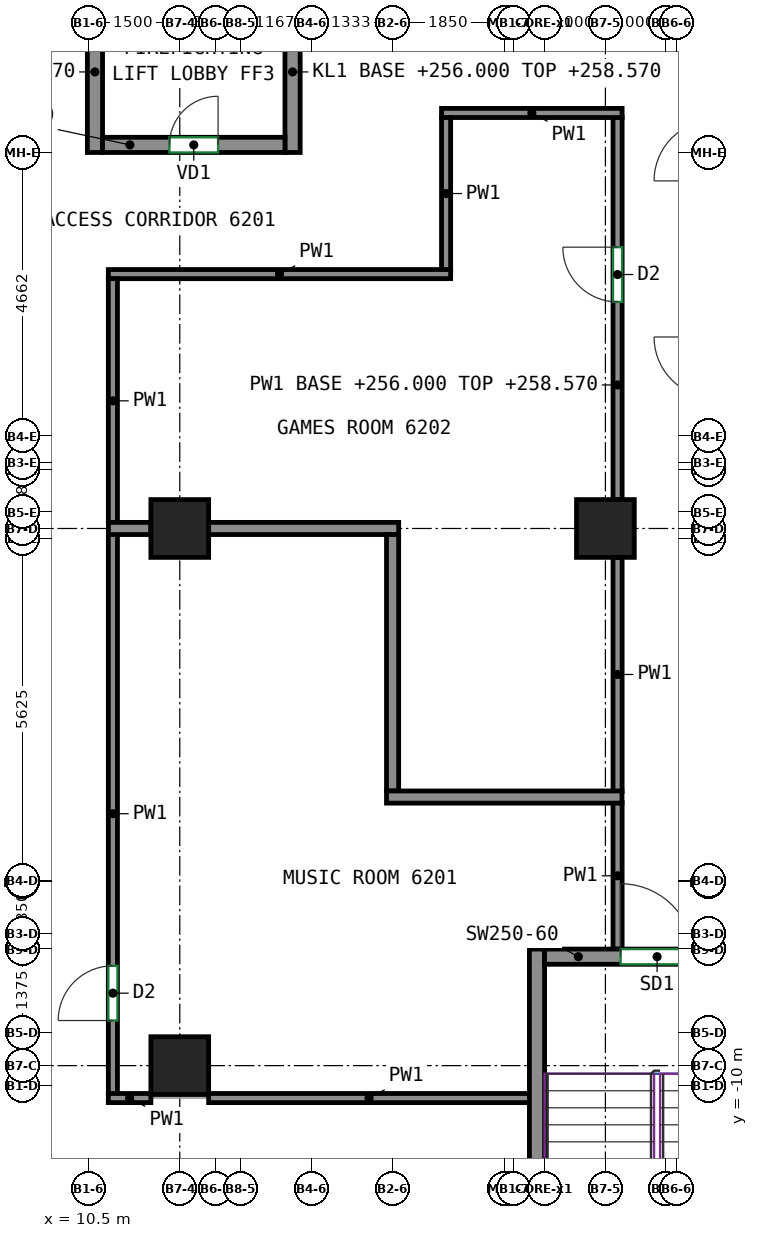
"""IFC4 building model, lengths in metres.
Left out: names, types, materials, properties, quantities, classifications, styles, units other than length and angle.
Written with IfcOpenShell. Run it as: python <this file> out.ifc"""

import sys

from ifc_helpers import new_model, si_unit, direction, frame, frame_2d, origin, origin_2d, place, context, subcontext, project, spatial, rectangle, extrude, source, transform, mapped, element, fill, save


model = new_model("IFC4")
c1 = context("Model", 3, precision=1e-05, world=origin(), true_north=direction((0.0, 1.0)))
c2 = subcontext(c1, "Body", "Model", "MODEL_VIEW")
j1 = project(units=[si_unit("LENGTHUNIT", "METRE"), si_unit("PLANEANGLEUNIT", "RADIAN")], contexts=[c1])
p1 = place(None, origin())
s1 = spatial("IfcSite", under=j1, at=p1, CompositionType="ELEMENT")
p2 = place(p1, origin())
s2 = spatial("IfcBuilding", under=s1, at=p2, CompositionType="ELEMENT")
p3 = place(p2, frame((0.0, 0.0, 256.0)))
s3 = spatial("IfcBuildingStorey", under=s2, at=p3, CompositionType="ELEMENT", Elevation=256.0)
m1 = source(origin(), c2, "Body", "SweptSolid", [
    extrude(rectangle(XDim=0.95, YDim=0.95, at=origin_2d()), origin(), (0.0, 0.0, 1.0), 3.12),
])
for number, where, z_axis, x_axis in (
    (1, (12.0, -9.667, 0.0), (0.0, 0.0, 1.0), (1.0, 0.0, 0.0)),
    (2, (12.0, -0.833, 0.0), (0.0, 0.0, 1.0), (1.0, 0.0, 0.0)),
    (3, (19.0, -0.833, 0.0), (0.0, 0.0, 1.0), (1.0, 0.0, 0.0)),
):
    element("IfcColumn", number, at=place(p3, frame(where, z_axis=z_axis, x_axis=x_axis)), inside=s3, PredefinedType="COLUMN", context=c2, shape_type="MappedRepresentation", body=[
        mapped(m1, transform((0.0, 0.0, 0.0))),
    ])
m2 = source(origin(), c2, "Body", "SweptSolid", [
    extrude(rectangle(XDim=8.0, YDim=0.25, at=frame_2d((4.0, 0.0))), origin(), (0.0, 0.0, 1.0), 3.12),
])
p4 = place(p3, frame((17.875, -15.75, 0.0), z_axis=(0.0, 0.0, 1.0), x_axis=(0.0, 1.0, 0.0)))
e4 = element("IfcWall", 4, at=p4, inside=s3, PredefinedType="SHEAR", context=c2, shape_type="MappedRepresentation", body=[
    mapped(m2, transform((0.0, 0.0, 0.0))),
])
m3 = source(origin(), c2, "Body", "SweptSolid", [
    extrude(rectangle(XDim=3.7, YDim=0.25, at=frame_2d((1.85, 0.0))), origin(), (0.0, 0.0, 1.0), 3.12),
])
p5 = place(p3, frame((18.0, -7.875, 0.0), z_axis=(0.0, 0.0, 1.0), x_axis=(1.0, 0.0, 0.0)))
e5 = element("IfcWall", 5, at=p5, inside=s3, PredefinedType="SHEAR", context=c2, shape_type="MappedRepresentation", body=[
    mapped(m3, transform((0.0, 0.0, 0.0))),
])
p6 = place(p5, frame((1.25, 0.0, 0.0)))
e6 = element("IfcOpeningElement", 6, at=p6, cuts=e5, PredefinedType="OPENING", context=c2, shape_type="SweptSolid", body=[
    extrude(rectangle(XDim=1.2, YDim=2.1, at=frame_2d((0.6, 1.05))), frame((0.0, 0.135, 0.0), z_axis=(0.0, -1.0, 0.0), x_axis=(1.0, 0.0, 0.0)), (0.0, 0.0, 1.0), 0.27),
])
m4 = source(origin(), c2, "Body", "SweptSolid", [
    extrude(rectangle(XDim=2.65, YDim=0.25, at=frame_2d((1.325, 0.0))), origin(), (0.0, 0.0, 1.0), 2.57),
])
for number, where, z_axis, x_axis in (
    (7, (10.605, 5.35, 0.0), (0.0, 0.0, 1.0), (0.0, 1.0, 0.0)),
    (8, (13.855, 5.35, 0.0), (0.0, 0.0, 1.0), (0.0, 1.0, 0.0)),
):
    element("IfcWall", number, at=place(p3, frame(where, z_axis=z_axis, x_axis=x_axis)), inside=s3, PredefinedType="PARTITIONING", context=c2, shape_type="MappedRepresentation", body=[
        mapped(m4, transform((0.0, 0.0, 0.0))),
    ])
m5 = source(origin(), c2, "Body", "SweptSolid", [
    extrude(rectangle(XDim=3.0, YDim=0.25, at=frame_2d((1.5, 0.0))), origin(), (0.0, 0.0, 1.0), 3.12),
])
p7 = place(p3, frame((10.73, 5.475, 0.0), z_axis=(0.0, 0.0, 1.0), x_axis=(1.0, 0.0, 0.0)))
e9 = element("IfcWall", 9, at=p7, inside=s3, PredefinedType="PARTITIONING", context=c2, shape_type="MappedRepresentation", body=[
    mapped(m5, transform((0.0, 0.0, 0.0))),
])
p8 = place(p7, frame((1.1, 0.0, 0.0)))
e10 = element("IfcOpeningElement", 10, at=p8, cuts=e9, PredefinedType="OPENING", context=c2, shape_type="SweptSolid", body=[
    extrude(rectangle(XDim=0.8, YDim=2.0, at=frame_2d((0.4, 1.0))), frame((0.0, 0.135, 0.0), z_axis=(0.0, -1.0, 0.0), x_axis=(1.0, 0.0, 0.0)), (0.0, 0.0, 1.0), 0.27),
])
p9 = place(p3, frame((19.2, -7.75, 0.0), z_axis=(0.0, 0.0, 1.0), x_axis=(0.0, 1.0, 0.0)))
e11 = element("IfcWall", 11, at=p9, inside=s3, PredefinedType="PARTITIONING", context=c2, shape_type="SweptSolid", body=[
    extrude(rectangle(XDim=2.41, YDim=0.15, at=frame_2d((1.205, 0.0))), origin(), (0.0, 0.0, 1.0), 3.12),
])
p10 = place(p3, frame((10.9, -10.125, 0.0), z_axis=(0.0, 0.0, 1.0), x_axis=(0.0, 1.0, 0.0)))
e12 = element("IfcWall", 12, at=p10, inside=s3, PredefinedType="PARTITIONING", context=c2, shape_type="SweptSolid", body=[
    extrude(rectangle(XDim=9.202, YDim=0.15, at=frame_2d((4.601, 0.0))), origin(), (0.0, 0.0, 1.0), 3.12),
])
p11 = place(p10, frame((1.2, 0.0, 0.0)))
e13 = element("IfcOpeningElement", 13, at=p11, cuts=e12, PredefinedType="OPENING", context=c2, shape_type="SweptSolid", body=[
    extrude(rectangle(XDim=0.9, YDim=2.1, at=frame_2d((0.45, 1.05))), frame((0.0, 0.085, 0.0), z_axis=(0.0, -1.0, 0.0), x_axis=(1.0, 0.0, 0.0)), (0.0, 0.0, 1.0), 0.17),
])
p12 = place(p3, frame((12.475, -10.2, 0.0), z_axis=(0.0, 0.0, 1.0), x_axis=(1.0, 0.0, 0.0)))
e14 = element("IfcWall", 14, at=p12, inside=s3, PredefinedType="PARTITIONING", context=c2, shape_type="SweptSolid", body=[
    extrude(rectangle(XDim=5.275, YDim=0.15, at=frame_2d((2.637, 0.0))), origin(), (0.0, 0.0, 1.0), 3.12),
])
p13 = place(p3, frame((10.825, -10.2, 0.0), z_axis=(0.0, 0.0, 1.0), x_axis=(1.0, 0.0, 0.0)))
e15 = element("IfcWall", 15, at=p13, inside=s3, PredefinedType="PARTITIONING", context=c2, shape_type="SweptSolid", body=[
    extrude(rectangle(XDim=0.7, YDim=0.15, at=frame_2d((0.35, 0.0))), origin(), (0.0, 0.0, 1.0), 3.12),
])
p14 = place(p3, frame((19.2, -5.16, 0.0), z_axis=(0.0, 0.0, 1.0), x_axis=(0.0, 1.0, 0.0)))
e16 = element("IfcWall", 16, at=p14, inside=s3, PredefinedType="PARTITIONING", context=c2, shape_type="SweptSolid", body=[
    extrude(rectangle(XDim=3.852, YDim=0.15, at=frame_2d((1.926, 0.0))), origin(), (0.0, 0.0, 1.0), 3.12),
])
p15 = place(p3, frame((19.2, -0.358, 0.0), z_axis=(0.0, 0.0, 1.0), x_axis=(0.0, 1.0, 0.0)))
e17 = element("IfcWall", 17, at=p15, inside=s3, PredefinedType="PARTITIONING", context=c2, shape_type="SweptSolid", body=[
    extrude(rectangle(XDim=6.283, YDim=0.15, at=frame_2d((3.142, 0.0))), origin(), (0.0, 0.0, 1.0), 2.57),
])
p16 = place(p15, frame((3.251, 0.0, 0.0)))
e18 = element("IfcOpeningElement", 18, at=p16, cuts=e17, PredefinedType="OPENING", context=c2, shape_type="SweptSolid", body=[
    extrude(rectangle(XDim=0.9, YDim=2.1, at=frame_2d((0.45, 1.05))), frame((0.0, 0.085, 0.0), z_axis=(0.0, -1.0, 0.0), x_axis=(1.0, 0.0, 0.0)), (0.0, 0.0, 1.0), 0.17),
])
p17 = place(p3, frame((16.305, 6.0, 0.0), z_axis=(0.0, 0.0, 1.0), x_axis=(1.0, 0.0, 0.0)))
e19 = element("IfcWall", 19, at=p17, inside=s3, PredefinedType="PARTITIONING", context=c2, shape_type="SweptSolid", body=[
    extrude(rectangle(XDim=2.97, YDim=0.15, at=frame_2d((1.485, 0.0))), origin(), (0.0, 0.0, 1.0), 3.12),
])
p18 = place(p3, frame((16.38, 3.425, 0.0), z_axis=(0.0, 0.0, 1.0), x_axis=(0.0, 1.0, 0.0)))
e20 = element("IfcWall", 20, at=p18, inside=s3, PredefinedType="PARTITIONING", context=c2, shape_type="SweptSolid", body=[
    extrude(rectangle(XDim=2.5, YDim=0.15, at=frame_2d((1.25, 0.0))), origin(), (0.0, 0.0, 1.0), 3.12),
])
p19 = place(p3, frame((10.825, 3.35, 0.0), z_axis=(0.0, 0.0, 1.0), x_axis=(1.0, 0.0, 0.0)))
e21 = element("IfcWall", 21, at=p19, inside=s3, PredefinedType="PARTITIONING", context=c2, shape_type="SweptSolid", body=[
    extrude(rectangle(XDim=5.63, YDim=0.15, at=frame_2d((2.815, 0.0))), origin(), (0.0, 0.0, 1.0), 3.12),
])
p20 = place(p3, frame((10.9, -0.743, 0.0), z_axis=(0.0, 0.0, 1.0), x_axis=(0.0, 1.0, 0.0)))
e22 = element("IfcWall", 22, at=p20, inside=s3, PredefinedType="PARTITIONING", context=c2, shape_type="SweptSolid", body=[
    extrude(rectangle(XDim=4.018, YDim=0.15, at=frame_2d((2.009, 0.0))), origin(), (0.0, 0.0, 1.0), 3.12),
])
p21 = place(p3, frame((10.827, -0.833, 0.0), z_axis=(0.0, 0.0, 1.0), x_axis=(1.0, 0.0, 0.0)))
e23 = element("IfcWall", 23, at=p21, inside=s3, PredefinedType="PARTITIONING", context=c2, shape_type="SweptSolid", body=[
    extrude(rectangle(XDim=0.698, YDim=0.2, at=frame_2d((0.349, 0.0))), origin(), (0.0, 0.0, 1.0), 3.12),
])
p22 = place(p3, frame((12.475, -0.833, 0.0), z_axis=(0.0, 0.0, 1.0), x_axis=(1.0, 0.0, 0.0)))
e24 = element("IfcWall", 24, at=p22, inside=s3, PredefinedType="PARTITIONING", context=c2, shape_type="SweptSolid", body=[
    extrude(rectangle(XDim=3.125, YDim=0.2, at=frame_2d((1.562, 0.0))), origin(), (0.0, 0.0, 1.0), 3.12),
])
p23 = place(p3, frame((15.5, -5.15, 0.0), z_axis=(0.0, 0.0, 1.0), x_axis=(0.0, 1.0, 0.0)))
e25 = element("IfcWall", 25, at=p23, inside=s3, PredefinedType="PARTITIONING", context=c2, shape_type="SweptSolid", body=[
    extrude(rectangle(XDim=4.217, YDim=0.2, at=frame_2d((2.108, 0.0))), origin(), (0.0, 0.0, 1.0), 3.12),
])
p24 = place(p3, frame((15.4, -5.25, 0.0), z_axis=(0.0, 0.0, 1.0), x_axis=(1.0, 0.0, 0.0)))
e26 = element("IfcWall", 26, at=p24, inside=s3, PredefinedType="PARTITIONING", context=c2, shape_type="SweptSolid", body=[
    extrude(rectangle(XDim=3.873, YDim=0.2, at=frame_2d((1.937, 0.0))), origin(), (0.0, 0.0, 1.0), 3.12),
])
p25 = place(p8, origin())
e27 = element("IfcDoor", 27, at=p25, inside=s3, OperationType="SINGLE_SWING_RIGHT", PredefinedType="DOOR", context=c2, shape_type="SweptSolid", body=[
    extrude(rectangle(XDim=0.8, YDim=2.0, at=frame_2d((0.4, 1.0))), frame((0.0, 0.025, 0.0), z_axis=(0.0, -1.0, 0.0), x_axis=(1.0, 0.0, 0.0)), (0.0, 0.0, 1.0), 0.05),
])
fill(e10, e27)
p26 = place(p6, origin())
e28 = element("IfcDoor", 28, at=p26, inside=s3, OperationType="DOUBLE_DOOR_SINGLE_SWING", PredefinedType="DOOR", context=c2, shape_type="SweptSolid", body=[
    extrude(rectangle(XDim=1.2, YDim=2.1, at=frame_2d((0.6, 1.05))), frame((0.0, 0.025, 0.0), z_axis=(0.0, -1.0, 0.0), x_axis=(1.0, 0.0, 0.0)), (0.0, 0.0, 1.0), 0.05),
])
fill(e6, e28)
p27 = place(p11, origin())
e29 = element("IfcDoor", 29, at=p27, inside=s3, OperationType="SINGLE_SWING_LEFT", PredefinedType="DOOR", context=c2, shape_type="SweptSolid", body=[
    extrude(rectangle(XDim=0.9, YDim=2.1, at=frame_2d((0.45, 1.05))), frame((0.0, 0.025, 0.0), z_axis=(0.0, -1.0, 0.0), x_axis=(1.0, 0.0, 0.0)), (0.0, 0.0, 1.0), 0.05),
])
fill(e13, e29)
p28 = place(p16, origin())
e30 = element("IfcDoor", 30, at=p28, inside=s3, OperationType="SINGLE_SWING_RIGHT", PredefinedType="DOOR", context=c2, shape_type="SweptSolid", body=[
    extrude(rectangle(XDim=0.9, YDim=2.1, at=frame_2d((0.45, 1.05))), frame((0.0, 0.025, 0.0), z_axis=(0.0, -1.0, 0.0), x_axis=(1.0, 0.0, 0.0)), (0.0, 0.0, 1.0), 0.05),
])
fill(e18, e30)
save(model, sys.argv[1])
